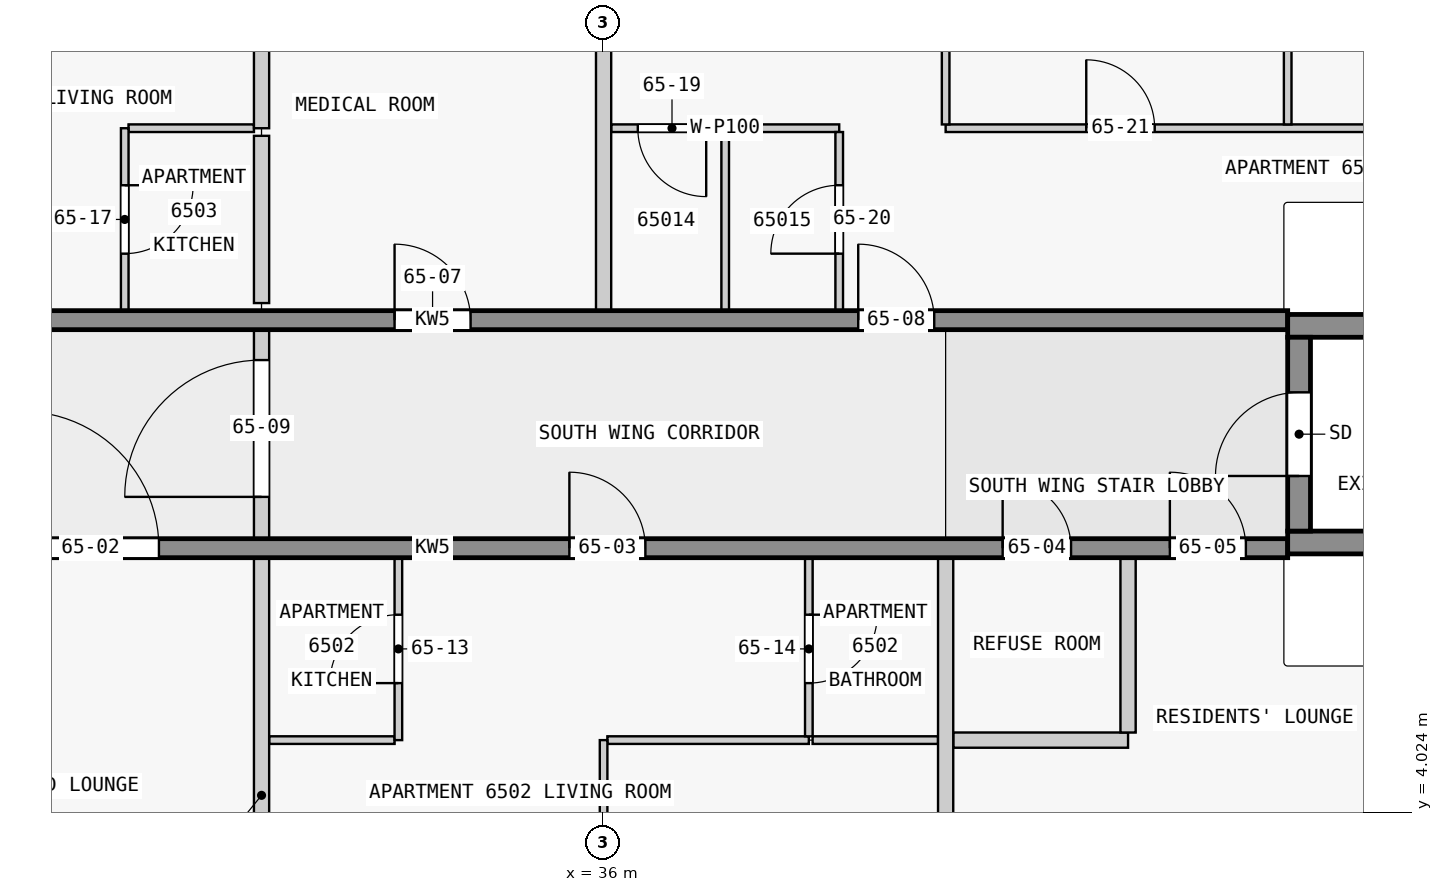
"""IFC4 building model, lengths in metres.
Left out: names, types, materials, properties, quantities, classifications, styles, units other than length and angle.
Written with IfcOpenShell. Run it as: python <this file> out.ifc"""

import sys

from ifc_helpers import new_model, si_unit, direction, frame, frame_2d, origin, place, context, subcontext, project, spatial, rectangle, extrude, element, fill, save


model = new_model("IFC4")
c1 = context("Model", 3, precision=1e-05, world=origin(), true_north=direction((0.0, 1.0)))
c2 = subcontext(c1, "Body", "Model", "MODEL_VIEW")
j1 = project(units=[si_unit("LENGTHUNIT", "METRE"), si_unit("PLANEANGLEUNIT", "RADIAN")], contexts=[c1])
p1 = place(None, origin())
s1 = spatial("IfcSite", under=j1, at=p1, CompositionType="ELEMENT")
p2 = place(p1, origin())
s2 = spatial("IfcBuilding", under=s1, at=p2, CompositionType="ELEMENT")
p3 = place(p2, frame((0.0, 0.0, 249.4)))
s3 = spatial("IfcBuildingStorey", under=s2, at=p3, CompositionType="ELEMENT", Elevation=249.4)
p4 = place(p3, frame((45.15, 7.725, 0.0), z_axis=(0.0, 0.0, 1.0), x_axis=(0.0, 1.0, 0.0)))
e1 = element("IfcWall", 1, at=p4, inside=s3, PredefinedType="SHEAR", context=c2, shape_type="SweptSolid", body=[
    extrude(rectangle(XDim=2.55, YDim=0.3, at=frame_2d((1.275, 0.0))), origin(), (0.0, 0.0, 1.0), 3.5),
])
p5 = place(p4, frame((0.725, 0.0, 0.0)))
e2 = element("IfcOpeningElement", 2, at=p5, cuts=e1, PredefinedType="OPENING", context=c2, shape_type="SweptSolid", body=[
    extrude(rectangle(XDim=1.1, YDim=2.1, at=frame_2d((0.55, 1.05))), frame((0.0, 0.16, 0.0), z_axis=(0.0, -1.0, 0.0), x_axis=(1.0, 0.0, 0.0)), (0.0, 0.0, 1.0), 0.32),
])
for number, where, z_axis, x_axis in (
    (3, (45.0, 7.575, 0.0), (0.0, 0.0, 1.0), (1.0, 0.0, 0.0)),
    (4, (45.0, 10.425, 0.0), (0.0, 0.0, 1.0), (1.0, 0.0, 0.0)),
):
    element("IfcWall", number, at=place(p3, frame(where, z_axis=z_axis, x_axis=x_axis)), inside=s3, PredefinedType="SHEAR", context=c2, shape_type="SweptSolid", body=[
        extrude(rectangle(XDim=7.2, YDim=0.3, at=frame_2d((3.6, 0.0))), origin(), (0.0, 0.0, 1.0), 3.5),
    ])
p6 = place(p3, frame((22.5, 7.5, 0.0), z_axis=(0.0, 0.0, 1.0), x_axis=(1.0, 0.0, 0.0)))
e5 = element("IfcWall", 5, at=p6, inside=s3, PredefinedType="SHEAR", context=c2, shape_type="SweptSolid", body=[
    extrude(rectangle(XDim=22.5, YDim=0.25, at=frame_2d((11.25, 0.0))), origin(), (0.0, 0.0, 1.0), 3.25),
])
p7 = place(p6, frame((1.75, 0.0, 0.0)))
e6 = element("IfcOpeningElement", 6, at=p7, cuts=e5, PredefinedType="OPENING", context=c2, shape_type="SweptSolid", body=[
    extrude(rectangle(XDim=1.0, YDim=2.1, at=frame_2d((0.5, 1.05))), frame((0.0, 0.135, 0.0), z_axis=(0.0, -1.0, 0.0), x_axis=(1.0, 0.0, 0.0)), (0.0, 0.0, 1.0), 0.27),
])
p8 = place(p6, frame((5.85, 0.0, 0.0)))
e7 = element("IfcOpeningElement", 7, at=p8, cuts=e5, PredefinedType="OPENING", context=c2, shape_type="SweptSolid", body=[
    extrude(rectangle(XDim=1.8, YDim=2.1, at=frame_2d((0.9, 1.05))), frame((0.0, 0.135, 0.0), z_axis=(0.0, -1.0, 0.0), x_axis=(1.0, 0.0, 0.0)), (0.0, 0.0, 1.0), 0.27),
])
p9 = place(p6, frame((13.05, 0.0, 0.0)))
e8 = element("IfcOpeningElement", 8, at=p9, cuts=e5, PredefinedType="OPENING", context=c2, shape_type="SweptSolid", body=[
    extrude(rectangle(XDim=1.0, YDim=2.1, at=frame_2d((0.5, 1.05))), frame((0.0, 0.135, 0.0), z_axis=(0.0, -1.0, 0.0), x_axis=(1.0, 0.0, 0.0)), (0.0, 0.0, 1.0), 0.27),
])
p10 = place(p6, frame((18.75, 0.0, 0.0)))
e9 = element("IfcOpeningElement", 9, at=p10, cuts=e5, PredefinedType="OPENING", context=c2, shape_type="SweptSolid", body=[
    extrude(rectangle(XDim=0.9, YDim=2.1, at=frame_2d((0.45, 1.05))), frame((0.0, 0.135, 0.0), z_axis=(0.0, -1.0, 0.0), x_axis=(1.0, 0.0, 0.0)), (0.0, 0.0, 1.0), 0.27),
])
p11 = place(p6, frame((20.95, 0.0, 0.0)))
e10 = element("IfcOpeningElement", 10, at=p11, cuts=e5, PredefinedType="OPENING", context=c2, shape_type="SweptSolid", body=[
    extrude(rectangle(XDim=1.0, YDim=2.1, at=frame_2d((0.5, 1.05))), frame((0.0, 0.135, 0.0), z_axis=(0.0, -1.0, 0.0), x_axis=(1.0, 0.0, 0.0)), (0.0, 0.0, 1.0), 0.27),
])
p12 = place(p3, frame((22.5, 10.5, 0.0), z_axis=(0.0, 0.0, 1.0), x_axis=(1.0, 0.0, 0.0)))
e11 = element("IfcWall", 11, at=p12, inside=s3, PredefinedType="SHEAR", context=c2, shape_type="SweptSolid", body=[
    extrude(rectangle(XDim=22.5, YDim=0.25, at=frame_2d((11.25, 0.0))), origin(), (0.0, 0.0, 1.0), 3.25),
])
p13 = place(p12, frame((4.05, 0.0, 0.0)))
e12 = element("IfcOpeningElement", 12, at=p13, cuts=e11, PredefinedType="OPENING", context=c2, shape_type="SweptSolid", body=[
    extrude(rectangle(XDim=1.0, YDim=2.1, at=frame_2d((0.5, 1.05))), frame((0.0, 0.135, 0.0), z_axis=(0.0, -1.0, 0.0), x_axis=(1.0, 0.0, 0.0)), (0.0, 0.0, 1.0), 0.27),
])
p14 = place(p12, frame((10.75, 0.0, 0.0)))
e13 = element("IfcOpeningElement", 13, at=p14, cuts=e11, PredefinedType="OPENING", context=c2, shape_type="SweptSolid", body=[
    extrude(rectangle(XDim=1.0, YDim=2.1, at=frame_2d((0.5, 1.05))), frame((0.0, 0.135, 0.0), z_axis=(0.0, -1.0, 0.0), x_axis=(1.0, 0.0, 0.0)), (0.0, 0.0, 1.0), 0.27),
])
p15 = place(p12, frame((16.85, 0.0, 0.0)))
e14 = element("IfcOpeningElement", 14, at=p15, cuts=e11, PredefinedType="OPENING", context=c2, shape_type="SweptSolid", body=[
    extrude(rectangle(XDim=1.0, YDim=2.1, at=frame_2d((0.5, 1.05))), frame((0.0, 0.135, 0.0), z_axis=(0.0, -1.0, 0.0), x_axis=(1.0, 0.0, 0.0)), (0.0, 0.0, 1.0), 0.27),
])
p16 = place(p3, frame((38.7, 4.975, 0.0), z_axis=(0.0, 0.0, 1.0), x_axis=(-1.0, 0.0, 0.0)))
e15 = element("IfcWall", 15, at=p16, inside=s3, PredefinedType="PARTITIONING", context=c2, shape_type="SweptSolid", body=[
    extrude(rectangle(XDim=2.65, YDim=0.1, at=frame_2d((1.325, 0.0))), origin(), (0.0, 0.0, 1.0), 3.25),
])
for number, where, z_axis, x_axis in (
    (16, (31.6, 4.975, 0.0), (0.0, 0.0, 1.0), (1.0, 0.0, 0.0)),
    (17, (38.75, 4.975, 0.0), (0.0, 0.0, 1.0), (1.0, 0.0, 0.0)),
):
    element("IfcWall", number, at=place(p3, frame(where, z_axis=z_axis, x_axis=x_axis)), inside=s3, PredefinedType="PARTITIONING", context=c2, shape_type="SweptSolid", body=[
        extrude(rectangle(XDim=1.65, YDim=0.1, at=frame_2d((0.825, 0.0))), origin(), (0.0, 0.0, 1.0), 3.25),
    ])
p17 = place(p3, frame((40.6, 4.975, 0.0), z_axis=(0.0, 0.0, 1.0), x_axis=(1.0, 0.0, 0.0)))
e18 = element("IfcWall", 18, at=p17, inside=s3, PredefinedType="PARTITIONING", context=c2, shape_type="SweptSolid", body=[
    extrude(rectangle(XDim=2.3, YDim=0.2, at=frame_2d((1.15, 0.0))), origin(), (0.0, 0.0, 1.0), 3.25),
])
p18 = place(p3, frame((31.4, 13.025, 0.0), z_axis=(0.0, 0.0, 1.0), x_axis=(-1.0, 0.0, 0.0)))
e19 = element("IfcWall", 19, at=p18, inside=s3, PredefinedType="PARTITIONING", context=c2, shape_type="SweptSolid", body=[
    extrude(rectangle(XDim=1.65, YDim=0.1, at=frame_2d((0.825, 0.0))), origin(), (0.0, 0.0, 1.0), 3.25),
])
p19 = place(p3, frame((39.1, 13.025, 0.0), z_axis=(0.0, 0.0, 1.0), x_axis=(-1.0, 0.0, 0.0)))
e20 = element("IfcWall", 20, at=p19, inside=s3, PredefinedType="PARTITIONING", context=c2, shape_type="SweptSolid", body=[
    extrude(rectangle(XDim=3.0, YDim=0.1, at=frame_2d((1.5, 0.0))), origin(), (0.0, 0.0, 1.0), 3.25),
])
p20 = place(p19, frame((1.75, 0.0, 0.0)))
e21 = element("IfcOpeningElement", 21, at=p20, cuts=e20, PredefinedType="OPENING", context=c2, shape_type="SweptSolid", body=[
    extrude(rectangle(XDim=0.9, YDim=2.1, at=frame_2d((0.45, 1.05))), frame((0.0, 0.06, 0.0), z_axis=(0.0, -1.0, 0.0), x_axis=(1.0, 0.0, 0.0)), (0.0, 0.0, 1.0), 0.12),
])
p21 = place(p3, frame((40.5, 13.025, 0.0), z_axis=(0.0, 0.0, 1.0), x_axis=(1.0, 0.0, 0.0)))
e22 = element("IfcWall", 22, at=p21, inside=s3, PredefinedType="PARTITIONING", context=c2, shape_type="SweptSolid", body=[
    extrude(rectangle(XDim=13.58, YDim=0.1, at=frame_2d((6.79, 0.0))), origin(), (0.0, 0.0, 1.0), 3.25),
])
p22 = place(p21, frame((1.85, 0.0, 0.0)))
e23 = element("IfcOpeningElement", 23, at=p22, cuts=e22, PredefinedType="OPENING", context=c2, shape_type="SweptSolid", body=[
    extrude(rectangle(XDim=0.9, YDim=2.1, at=frame_2d((0.45, 1.05))), frame((0.0, 0.06, 0.0), z_axis=(0.0, -1.0, 0.0), x_axis=(1.0, 0.0, 0.0)), (0.0, 0.0, 1.0), 0.12),
])
p23 = place(p21, frame((6.35, 0.0, 0.0)))
e24 = element("IfcOpeningElement", 24, at=p23, cuts=e22, PredefinedType="OPENING", context=c2, shape_type="SweptSolid", body=[
    extrude(rectangle(XDim=0.9, YDim=2.1, at=frame_2d((0.45, 1.05))), frame((0.0, 0.06, 0.0), z_axis=(0.0, -1.0, 0.0), x_axis=(1.0, 0.0, 0.0)), (0.0, 0.0, 1.0), 0.12),
])
p24 = place(p21, frame((10.75, 0.0, 0.0)))
e25 = element("IfcOpeningElement", 25, at=p24, cuts=e22, PredefinedType="OPENING", context=c2, shape_type="SweptSolid", body=[
    extrude(rectangle(XDim=0.9, YDim=2.1, at=frame_2d((0.45, 1.05))), frame((0.0, 0.06, 0.0), z_axis=(0.0, -1.0, 0.0), x_axis=(1.0, 0.0, 0.0)), (0.0, 0.0, 1.0), 0.12),
])
p25 = place(p3, frame((29.7, 13.025, 0.0), z_axis=(0.0, 0.0, 1.0), x_axis=(0.0, -1.0, 0.0)))
e26 = element("IfcWall", 26, at=p25, inside=s3, PredefinedType="PARTITIONING", context=c2, shape_type="SweptSolid", body=[
    extrude(rectangle(XDim=2.4, YDim=0.1, at=frame_2d((1.2, 0.0))), origin(), (0.0, 0.0, 1.0), 3.25),
])
p26 = place(p25, frame((0.75, 0.0, 0.0)))
e27 = element("IfcOpeningElement", 27, at=p26, cuts=e26, PredefinedType="OPENING", context=c2, shape_type="SweptSolid", body=[
    extrude(rectangle(XDim=0.9, YDim=2.1, at=frame_2d((0.45, 1.05))), frame((0.0, 0.06, 0.0), z_axis=(0.0, -1.0, 0.0), x_axis=(1.0, 0.0, 0.0)), (0.0, 0.0, 1.0), 0.12),
])
p27 = place(p3, frame((31.5, 16.878, 0.0), z_axis=(0.0, 0.0, 1.0), x_axis=(0.0, -1.0, 0.0)))
e28 = element("IfcWall", 28, at=p27, inside=s3, PredefinedType="PARTITIONING", context=c2, shape_type="SweptSolid", body=[
    extrude(rectangle(XDim=3.853, YDim=0.2, at=frame_2d((1.926, 0.0))), origin(), (0.0, 0.0, 1.0), 3.25),
])
p28 = place(p3, frame((31.5, 1.122, 0.0), z_axis=(0.0, 0.0, 1.0), x_axis=(0.0, 1.0, 0.0)))
e29 = element("IfcWall", 29, at=p28, inside=s3, PredefinedType="PARTITIONING", context=c2, shape_type="SweptSolid", body=[
    extrude(rectangle(XDim=6.253, YDim=0.2, at=frame_2d((3.126, 0.0))), origin(), (0.0, 0.0, 1.0), 3.25),
])
p29 = place(p3, frame((31.5, 10.725, 0.0), z_axis=(0.0, 0.0, 1.0), x_axis=(0.0, 1.0, 0.0)))
e30 = element("IfcWall", 30, at=p29, inside=s3, PredefinedType="PARTITIONING", context=c2, shape_type="SweptSolid", body=[
    extrude(rectangle(XDim=2.2, YDim=0.2, at=frame_2d((1.1, 0.0))), origin(), (0.0, 0.0, 1.0), 3.25),
])
p30 = place(p3, frame((33.3, 4.975, 0.0), z_axis=(0.0, 0.0, 1.0), x_axis=(0.0, 1.0, 0.0)))
e31 = element("IfcWall", 31, at=p30, inside=s3, PredefinedType="PARTITIONING", context=c2, shape_type="SweptSolid", body=[
    extrude(rectangle(XDim=2.4, YDim=0.1, at=frame_2d((1.2, 0.0))), origin(), (0.0, 0.0, 1.0), 3.25),
])
p31 = place(p30, frame((0.75, 0.0, 0.0)))
e32 = element("IfcOpeningElement", 32, at=p31, cuts=e31, PredefinedType="OPENING", context=c2, shape_type="SweptSolid", body=[
    extrude(rectangle(XDim=0.9, YDim=2.1, at=frame_2d((0.45, 1.05))), frame((0.0, 0.06, 0.0), z_axis=(0.0, -1.0, 0.0), x_axis=(1.0, 0.0, 0.0)), (0.0, 0.0, 1.0), 0.12),
])
p32 = place(p3, frame((36.0, 4.975, 0.0), z_axis=(0.0, 0.0, 1.0), x_axis=(0.0, -1.0, 0.0)))
e33 = element("IfcWall", 33, at=p32, inside=s3, PredefinedType="PARTITIONING", context=c2, shape_type="SweptSolid", body=[
    extrude(rectangle(XDim=3.575, YDim=0.1, at=frame_2d((1.788, 0.0))), origin(), (0.0, 0.0, 1.0), 3.25),
])
p33 = place(p32, frame((1.35, 0.0, 0.0)))
e34 = element("IfcOpeningElement", 34, at=p33, cuts=e33, PredefinedType="OPENING", context=c2, shape_type="SweptSolid", body=[
    extrude(rectangle(XDim=0.9, YDim=2.1, at=frame_2d((0.45, 1.05))), frame((0.0, 0.06, 0.0), z_axis=(0.0, -1.0, 0.0), x_axis=(1.0, 0.0, 0.0)), (0.0, 0.0, 1.0), 0.12),
])
p34 = place(p3, frame((36.0, 10.625, 0.0), z_axis=(0.0, 0.0, 1.0), x_axis=(0.0, 1.0, 0.0)))
e35 = element("IfcWall", 35, at=p34, inside=s3, PredefinedType="PARTITIONING", context=c2, shape_type="SweptSolid", body=[
    extrude(rectangle(XDim=5.975, YDim=0.2, at=frame_2d((2.988, 0.0))), origin(), (0.0, 0.0, 1.0), 3.25),
])
p35 = place(p3, frame((37.6, 10.625, 0.0), z_axis=(0.0, 0.0, 1.0), x_axis=(0.0, 1.0, 0.0)))
e36 = element("IfcWall", 36, at=p35, inside=s3, PredefinedType="PARTITIONING", context=c2, shape_type="SweptSolid", body=[
    extrude(rectangle(XDim=2.35, YDim=0.1, at=frame_2d((1.175, 0.0))), origin(), (0.0, 0.0, 1.0), 3.25),
])
p36 = place(p3, frame((38.7, 7.375, 0.0), z_axis=(0.0, 0.0, 1.0), x_axis=(0.0, -1.0, 0.0)))
e37 = element("IfcWall", 37, at=p36, inside=s3, PredefinedType="PARTITIONING", context=c2, shape_type="SweptSolid", body=[
    extrude(rectangle(XDim=2.35, YDim=0.1, at=frame_2d((1.175, 0.0))), origin(), (0.0, 0.0, 1.0), 3.25),
])
p37 = place(p36, frame((0.75, 0.0, 0.0)))
e38 = element("IfcOpeningElement", 38, at=p37, cuts=e37, PredefinedType="OPENING", context=c2, shape_type="SweptSolid", body=[
    extrude(rectangle(XDim=0.9, YDim=2.1, at=frame_2d((0.45, 1.05))), frame((0.0, 0.06, 0.0), z_axis=(0.0, -1.0, 0.0), x_axis=(1.0, 0.0, 0.0)), (0.0, 0.0, 1.0), 0.12),
])
p38 = place(p3, frame((39.1, 10.625, 0.0), z_axis=(0.0, 0.0, 1.0), x_axis=(0.0, 1.0, 0.0)))
e39 = element("IfcWall", 39, at=p38, inside=s3, PredefinedType="PARTITIONING", context=c2, shape_type="SweptSolid", body=[
    extrude(rectangle(XDim=2.35, YDim=0.1, at=frame_2d((1.175, 0.0))), origin(), (0.0, 0.0, 1.0), 3.25),
])
p39 = place(p38, frame((0.75, 0.0, 0.0)))
e40 = element("IfcOpeningElement", 40, at=p39, cuts=e39, PredefinedType="OPENING", context=c2, shape_type="SweptSolid", body=[
    extrude(rectangle(XDim=0.9, YDim=2.1, at=frame_2d((0.45, 1.05))), frame((0.0, 0.06, 0.0), z_axis=(0.0, -1.0, 0.0), x_axis=(1.0, 0.0, 0.0)), (0.0, 0.0, 1.0), 0.12),
])
p40 = place(p3, frame((40.5, 16.878, 0.0), z_axis=(0.0, 0.0, 1.0), x_axis=(0.0, -1.0, 0.0)))
e41 = element("IfcWall", 41, at=p40, inside=s3, PredefinedType="PARTITIONING", context=c2, shape_type="SweptSolid", body=[
    extrude(rectangle(XDim=3.803, YDim=0.1, at=frame_2d((1.901, 0.0))), origin(), (0.0, 0.0, 1.0), 3.25),
])
p41 = place(p3, frame((40.5, 1.122, 0.0), z_axis=(0.0, 0.0, 1.0), x_axis=(0.0, 1.0, 0.0)))
e42 = element("IfcWall", 42, at=p41, inside=s3, PredefinedType="PARTITIONING", context=c2, shape_type="SweptSolid", body=[
    extrude(rectangle(XDim=6.253, YDim=0.2, at=frame_2d((3.126, 0.0))), origin(), (0.0, 0.0, 1.0), 3.25),
])
p42 = place(p3, frame((42.9, 5.075, 0.0), z_axis=(0.0, 0.0, 1.0), x_axis=(0.0, 1.0, 0.0)))
e43 = element("IfcWall", 43, at=p42, inside=s3, PredefinedType="PARTITIONING", context=c2, shape_type="SweptSolid", body=[
    extrude(rectangle(XDim=2.3, YDim=0.2, at=frame_2d((1.15, 0.0))), origin(), (0.0, 0.0, 1.0), 3.25),
])
p43 = place(p3, frame((45.0, 13.075, 0.0), z_axis=(0.0, 0.0, 1.0), x_axis=(0.0, 1.0, 0.0)))
e44 = element("IfcWall", 44, at=p43, inside=s3, PredefinedType="PARTITIONING", context=c2, shape_type="SweptSolid", body=[
    extrude(rectangle(XDim=3.398, YDim=0.1, at=frame_2d((1.699, 0.0))), origin(), (0.0, 0.0, 1.0), 3.25),
])
p44 = place(p3, frame((31.5, 7.475, 0.0), z_axis=(0.0, 0.0, 1.0), x_axis=(0.0, 1.0, 0.0)))
e45 = element("IfcWall", 45, at=p44, inside=s3, PredefinedType="PARTITIONING", context=c2, shape_type="SweptSolid", body=[
    extrude(rectangle(XDim=3.15, YDim=0.2, at=frame_2d((1.575, 0.0))), origin(), (0.0, 0.0, 1.0), 3.25),
])
p45 = place(p44, frame((0.7, 0.0, 0.0)))
e46 = element("IfcOpeningElement", 46, at=p45, cuts=e45, PredefinedType="OPENING", context=c2, shape_type="SweptSolid", body=[
    extrude(rectangle(XDim=1.8, YDim=2.1, at=frame_2d((0.9, 1.05))), frame((0.0, 0.11, 0.0), z_axis=(0.0, -1.0, 0.0), x_axis=(1.0, 0.0, 0.0)), (0.0, 0.0, 1.0), 0.22),
])
p46 = place(p5, origin())
e47 = element("IfcDoor", 47, at=p46, inside=s3, OperationType="SINGLE_SWING_LEFT", PredefinedType="DOOR", context=c2, shape_type="SweptSolid", body=[
    extrude(rectangle(XDim=1.1, YDim=2.1, at=frame_2d((0.55, 1.05))), frame((0.0, 0.025, 0.0), z_axis=(0.0, -1.0, 0.0), x_axis=(1.0, 0.0, 0.0)), (0.0, 0.0, 1.0), 0.05),
])
fill(e2, e47)
p47 = place(p8, origin())
e48 = element("IfcDoor", 48, at=p47, inside=s3, OperationType="SINGLE_SWING_LEFT", PredefinedType="DOOR", context=c2, shape_type="SweptSolid", body=[
    extrude(rectangle(XDim=1.8, YDim=2.1, at=frame_2d((0.9, 1.05))), frame((0.0, 0.025, 0.0), z_axis=(0.0, -1.0, 0.0), x_axis=(1.0, 0.0, 0.0)), (0.0, 0.0, 1.0), 0.05),
])
fill(e7, e48)
p48 = place(p9, origin())
e49 = element("IfcDoor", 49, at=p48, inside=s3, OperationType="SINGLE_SWING_RIGHT", PredefinedType="DOOR", context=c2, shape_type="SweptSolid", body=[
    extrude(rectangle(XDim=1.0, YDim=2.1, at=frame_2d((0.5, 1.05))), frame((0.0, 0.025, 0.0), z_axis=(0.0, -1.0, 0.0), x_axis=(1.0, 0.0, 0.0)), (0.0, 0.0, 1.0), 0.05),
])
fill(e8, e49)
p49 = place(p10, origin())
e50 = element("IfcDoor", 50, at=p49, inside=s3, OperationType="SINGLE_SWING_RIGHT", PredefinedType="DOOR", context=c2, shape_type="SweptSolid", body=[
    extrude(rectangle(XDim=0.9, YDim=2.1, at=frame_2d((0.45, 1.05))), frame((0.0, 0.025, 0.0), z_axis=(0.0, -1.0, 0.0), x_axis=(1.0, 0.0, 0.0)), (0.0, 0.0, 1.0), 0.05),
])
fill(e9, e50)
p50 = place(p11, origin())
e51 = element("IfcDoor", 51, at=p50, inside=s3, OperationType="SINGLE_SWING_RIGHT", PredefinedType="DOOR", context=c2, shape_type="SweptSolid", body=[
    extrude(rectangle(XDim=1.0, YDim=2.1, at=frame_2d((0.5, 1.05))), frame((0.0, 0.025, 0.0), z_axis=(0.0, -1.0, 0.0), x_axis=(1.0, 0.0, 0.0)), (0.0, 0.0, 1.0), 0.05),
])
fill(e10, e51)
p51 = place(p14, origin())
e52 = element("IfcDoor", 52, at=p51, inside=s3, OperationType="SINGLE_SWING_LEFT", PredefinedType="DOOR", context=c2, shape_type="SweptSolid", body=[
    extrude(rectangle(XDim=1.0, YDim=2.1, at=frame_2d((0.5, 1.05))), frame((0.0, 0.025, 0.0), z_axis=(0.0, -1.0, 0.0), x_axis=(1.0, 0.0, 0.0)), (0.0, 0.0, 1.0), 0.05),
])
fill(e13, e52)
p52 = place(p15, origin())
e53 = element("IfcDoor", 53, at=p52, inside=s3, OperationType="SINGLE_SWING_RIGHT", PredefinedType="DOOR", context=c2, shape_type="SweptSolid", body=[
    extrude(rectangle(XDim=1.0, YDim=2.1, at=frame_2d((0.5, 1.05))), frame((0.0, 0.025, 0.0), z_axis=(0.0, -1.0, 0.0), x_axis=(1.0, 0.0, 0.0)), (0.0, 0.0, 1.0), 0.05),
])
fill(e14, e53)
p53 = place(p45, origin())
e54 = element("IfcDoor", 54, at=p53, inside=s3, OperationType="SINGLE_SWING_RIGHT", PredefinedType="DOOR", context=c2, shape_type="SweptSolid", body=[
    extrude(rectangle(XDim=1.8, YDim=2.1, at=frame_2d((0.9, 1.05))), frame((0.0, 0.025, 0.0), z_axis=(0.0, -1.0, 0.0), x_axis=(1.0, 0.0, 0.0)), (0.0, 0.0, 1.0), 0.05),
])
fill(e46, e54)
p54 = place(p31, origin())
e55 = element("IfcDoor", 55, at=p54, inside=s3, OperationType="SINGLE_SWING_LEFT", PredefinedType="DOOR", context=c2, shape_type="SweptSolid", body=[
    extrude(rectangle(XDim=0.9, YDim=2.1, at=frame_2d((0.45, 1.05))), frame((0.0, 0.025, 0.0), z_axis=(0.0, -1.0, 0.0), x_axis=(1.0, 0.0, 0.0)), (0.0, 0.0, 1.0), 0.05),
])
fill(e32, e55)
p55 = place(p37, origin())
e56 = element("IfcDoor", 56, at=p55, inside=s3, OperationType="SINGLE_SWING_RIGHT", PredefinedType="DOOR", context=c2, shape_type="SweptSolid", body=[
    extrude(rectangle(XDim=0.9, YDim=2.1, at=frame_2d((0.45, 1.05))), frame((0.0, 0.025, 0.0), z_axis=(0.0, -1.0, 0.0), x_axis=(1.0, 0.0, 0.0)), (0.0, 0.0, 1.0), 0.05),
])
fill(e38, e56)
p56 = place(p26, origin())
e57 = element("IfcDoor", 57, at=p56, inside=s3, OperationType="SINGLE_SWING_LEFT", PredefinedType="DOOR", context=c2, shape_type="SweptSolid", body=[
    extrude(rectangle(XDim=0.9, YDim=2.1, at=frame_2d((0.45, 1.05))), frame((0.0, 0.025, 0.0), z_axis=(0.0, -1.0, 0.0), x_axis=(1.0, 0.0, 0.0)), (0.0, 0.0, 1.0), 0.05),
])
fill(e27, e57)
p57 = place(p20, origin())
e58 = element("IfcDoor", 58, at=p57, inside=s3, OperationType="SINGLE_SWING_RIGHT", PredefinedType="DOOR", context=c2, shape_type="SweptSolid", body=[
    extrude(rectangle(XDim=0.9, YDim=2.1, at=frame_2d((0.45, 1.05))), frame((0.0, 0.025, 0.0), z_axis=(0.0, -1.0, 0.0), x_axis=(1.0, 0.0, 0.0)), (0.0, 0.0, 1.0), 0.05),
])
fill(e21, e58)
p58 = place(p39, origin())
e59 = element("IfcDoor", 59, at=p58, inside=s3, OperationType="SINGLE_SWING_RIGHT", PredefinedType="DOOR", context=c2, shape_type="SweptSolid", body=[
    extrude(rectangle(XDim=0.9, YDim=2.1, at=frame_2d((0.45, 1.05))), frame((0.0, 0.025, 0.0), z_axis=(0.0, -1.0, 0.0), x_axis=(1.0, 0.0, 0.0)), (0.0, 0.0, 1.0), 0.05),
])
fill(e40, e59)
p59 = place(p22, origin())
e60 = element("IfcDoor", 60, at=p59, inside=s3, OperationType="SINGLE_SWING_LEFT", PredefinedType="DOOR", context=c2, shape_type="SweptSolid", body=[
    extrude(rectangle(XDim=0.9, YDim=2.1, at=frame_2d((0.45, 1.05))), frame((0.0, 0.025, 0.0), z_axis=(0.0, -1.0, 0.0), x_axis=(1.0, 0.0, 0.0)), (0.0, 0.0, 1.0), 0.05),
])
fill(e23, e60)
save(model, sys.argv[1])
